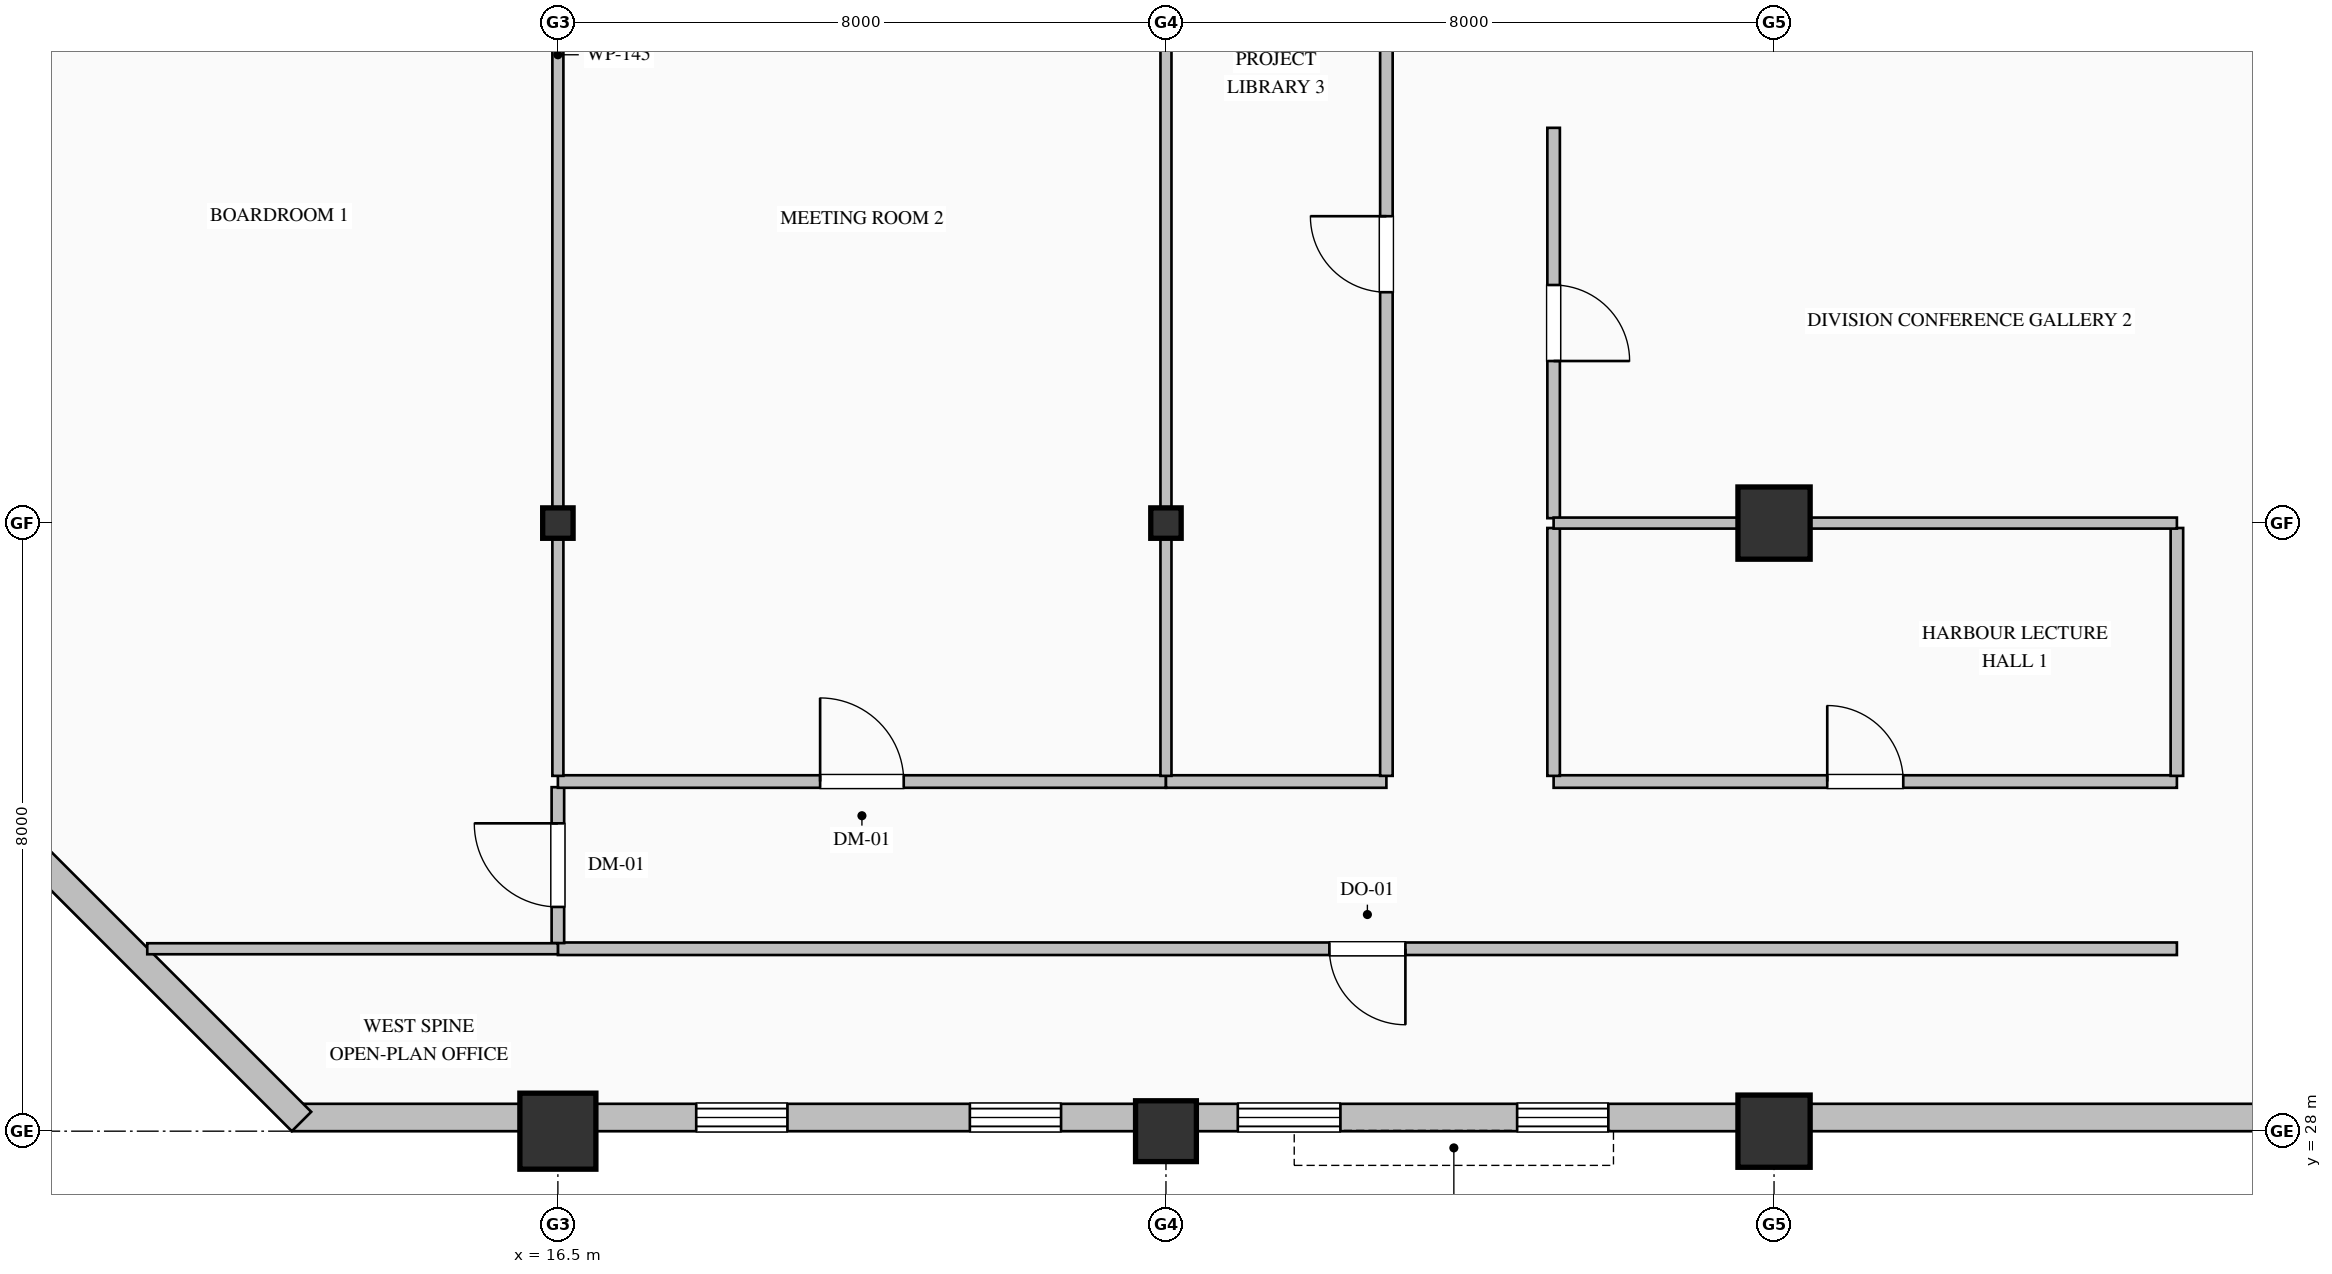
"""IFC4 building model, lengths in metres.
Left out: names, types, materials, properties, quantities, classifications, styles, units other than length and angle.
Written with IfcOpenShell. Run it as: python <this file> out.ifc"""

import sys

from ifc_helpers import new_model, si_unit, direction, frame, frame_2d, origin, origin_2d, place, context, subcontext, project, spatial, rectangle, hollow_rectangle, hollow_circle, i_section, extrude, element, fill, save


model = new_model("IFC4")
c1 = context("Model", 3, precision=1e-05, world=origin(), true_north=direction((0.0, 1.0)))
c2 = subcontext(c1, "Body", "Model", "MODEL_VIEW")
j1 = project(units=[si_unit("LENGTHUNIT", "METRE"), si_unit("PLANEANGLEUNIT", "RADIAN")], contexts=[c1])
p1 = place(None, origin())
s1 = spatial("IfcSite", under=j1, at=p1, CompositionType="ELEMENT")
p2 = place(p1, origin())
s2 = spatial("IfcBuilding", under=s1, at=p2, CompositionType="ELEMENT")
p3 = place(p2, frame((0.0, 0.0, 225.8)))
s3 = spatial("IfcBuildingStorey", under=s2, at=p3, CompositionType="ELEMENT", Elevation=225.8)
p4 = place(p3, frame((16.5, 28.0, 0.0), z_axis=(0.0, 0.0, 1.0), x_axis=(1.0, 0.0, 0.0)))
e1 = element("IfcColumn", 1, at=p4, inside=s3, PredefinedType="COLUMN", context=c2, shape_type="SweptSolid", body=[
    extrude(hollow_circle(Radius=0.5, WallThickness=0.036, at=origin_2d()), origin(), (0.0, 0.0, 1.0), 4.0),
])
p5 = place(p3, frame((16.5, 36.0, 0.0), z_axis=(0.0, 0.0, 1.0), x_axis=(1.0, 0.0, 0.0)))
e2 = element("IfcColumn", 2, at=p5, inside=s3, PredefinedType="COLUMN", context=c2, shape_type="SweptSolid", body=[
    extrude(i_section(OverallWidth=0.4, OverallDepth=0.4, WebThickness=0.013, FlangeThickness=0.021, FilletRadius=0.022, at=origin_2d()), origin(), (0.0, 0.0, 1.0), 4.0),
])
p6 = place(p3, frame((24.5, 28.0, 0.0), z_axis=(0.0, 0.0, 1.0), x_axis=(1.0, 0.0, 0.0)))
e3 = element("IfcColumn", 3, at=p6, inside=s3, PredefinedType="COLUMN", context=c2, shape_type="SweptSolid", body=[
    extrude(hollow_rectangle(XDim=0.8, YDim=0.8, WallThickness=0.032, at=origin_2d()), origin(), (0.0, 0.0, 1.0), 4.0),
])
p7 = place(p3, frame((24.5, 36.0, 0.0), z_axis=(0.0, 0.0, 1.0), x_axis=(1.0, 0.0, 0.0)))
e4 = element("IfcColumn", 4, at=p7, inside=s3, PredefinedType="COLUMN", context=c2, shape_type="SweptSolid", body=[
    extrude(i_section(OverallWidth=0.4, OverallDepth=0.4, WebThickness=0.013, FlangeThickness=0.021, FilletRadius=0.022, at=origin_2d()), origin(), (0.0, 0.0, 1.0), 4.0),
])
for number, where, z_axis, x_axis in (
    (5, (32.5, 28.0, 0.0), (0.0, 0.0, 1.0), (1.0, 0.0, 0.0)),
    (6, (32.5, 36.0, 0.0), (0.0, 0.0, 1.0), (1.0, 0.0, 0.0)),
):
    element("IfcColumn", number, at=place(p3, frame(where, z_axis=z_axis, x_axis=x_axis)), inside=s3, PredefinedType="COLUMN", context=c2, shape_type="SweptSolid", body=[
        extrude(hollow_rectangle(XDim=0.95, YDim=0.95, WallThickness=0.036, at=origin_2d()), origin(), (0.0, 0.0, 1.0), 4.0),
    ])
p8 = place(p3, frame((40.52, 28.18, 0.0), z_axis=(0.0, 0.0, 1.0), x_axis=(-1.0, 0.0, 0.0)))
e7 = element("IfcWall", 7, at=p8, inside=s3, PredefinedType="SOLIDWALL", context=c2, shape_type="SweptSolid", body=[
    extrude(rectangle(XDim=27.52, YDim=0.36, at=frame_2d((13.76, 0.0))), origin(), (0.0, 0.0, 1.0), 3.187),
])
p9 = place(p8, frame((10.2, 0.0, 0.9)))
e8 = element("IfcOpeningElement", 8, at=p9, cuts=e7, PredefinedType="OPENING", context=c2, shape_type="SweptSolid", body=[
    extrude(rectangle(XDim=1.2, YDim=1.85, at=frame_2d((0.6, 0.925))), frame((0.0, 0.19, 0.0), z_axis=(0.0, -1.0, 0.0), x_axis=(1.0, 0.0, 0.0)), (0.0, 0.0, 1.0), 0.38),
])
p10 = place(p8, frame((13.725, 0.0, 0.9)))
e9 = element("IfcOpeningElement", 9, at=p10, cuts=e7, PredefinedType="OPENING", context=c2, shape_type="SweptSolid", body=[
    extrude(rectangle(XDim=1.35, YDim=1.85, at=frame_2d((0.675, 0.925))), frame((0.0, 0.19, 0.0), z_axis=(0.0, -1.0, 0.0), x_axis=(1.0, 0.0, 0.0)), (0.0, 0.0, 1.0), 0.38),
])
p11 = place(p8, frame((17.4, 0.0, 0.7)))
e10 = element("IfcOpeningElement", 10, at=p11, cuts=e7, PredefinedType="OPENING", context=c2, shape_type="SweptSolid", body=[
    extrude(rectangle(XDim=1.2, YDim=1.85, at=frame_2d((0.6, 0.925))), frame((0.0, 0.19, 0.0), z_axis=(0.0, -1.0, 0.0), x_axis=(1.0, 0.0, 0.0)), (0.0, 0.0, 1.0), 0.38),
])
p12 = place(p8, frame((21.0, 0.0, 0.9)))
e11 = element("IfcOpeningElement", 11, at=p12, cuts=e7, PredefinedType="OPENING", context=c2, shape_type="SweptSolid", body=[
    extrude(rectangle(XDim=1.2, YDim=1.85, at=frame_2d((0.6, 0.925))), frame((0.0, 0.19, 0.0), z_axis=(0.0, -1.0, 0.0), x_axis=(1.0, 0.0, 0.0)), (0.0, 0.0, 1.0), 0.38),
])
p13 = place(p3, frame((13.127, 28.127, 0.0), z_axis=(0.0, 0.0, 1.0), x_axis=(-0.707106781187, 0.707106781187, 0.0)))
e12 = element("IfcWall", 12, at=p13, inside=s3, PredefinedType="SOLIDWALL", context=c2, shape_type="SweptSolid", body=[
    extrude(rectangle(XDim=5.657, YDim=0.36, at=frame_2d((2.828, 0.0))), origin(), (0.0, 0.0, 1.0), 3.775),
])
p14 = place(p3, frame((37.8, 30.4, 0.0), z_axis=(0.0, 0.0, 1.0), x_axis=(-1.0, 0.0, 0.0)))
e13 = element("IfcWall", 13, at=p14, inside=s3, PredefinedType="PARTITIONING", context=c2, shape_type="SweptSolid", body=[
    extrude(rectangle(XDim=21.3, YDim=0.165, at=frame_2d((10.65, 0.0))), origin(), (0.0, 0.0, 1.0), 3.775),
])
p15 = place(p14, frame((10.15, 0.0, 0.0)))
e14 = element("IfcOpeningElement", 14, at=p15, cuts=e13, PredefinedType="OPENING", context=c2, shape_type="SweptSolid", body=[
    extrude(rectangle(XDim=1.0, YDim=2.15, at=frame_2d((0.5, 1.075))), frame((0.0, 0.093, 0.0), z_axis=(0.0, -1.0, 0.0), x_axis=(1.0, 0.0, 0.0)), (0.0, 0.0, 1.0), 0.185),
])
p16 = place(p3, frame((16.5, 30.475, 0.0), z_axis=(0.0, 0.0, 1.0), x_axis=(0.0, 1.0, 0.0)))
e15 = element("IfcWall", 15, at=p16, inside=s3, PredefinedType="PARTITIONING", context=c2, shape_type="SweptSolid", body=[
    extrude(rectangle(XDim=2.051, YDim=0.165, at=frame_2d((1.025, 0.0))), origin(), (0.0, 0.0, 1.0), 3.179),
])
p17 = place(p16, frame((0.476, 0.0, 0.0)))
e16 = element("IfcOpeningElement", 16, at=p17, cuts=e15, PredefinedType="OPENING", context=c2, shape_type="SweptSolid", body=[
    extrude(rectangle(XDim=1.1, YDim=2.2, at=frame_2d((0.55, 1.1))), frame((0.0, 0.093, 0.0), z_axis=(0.0, -1.0, 0.0), x_axis=(1.0, 0.0, 0.0)), (0.0, 0.0, 1.0), 0.185),
])
p18 = place(p3, frame((16.5, 32.6, 0.0), z_axis=(0.0, 0.0, 1.0), x_axis=(1.0, 0.0, 0.0)))
e17 = element("IfcWall", 17, at=p18, inside=s3, PredefinedType="PARTITIONING", context=c2, shape_type="SweptSolid", body=[
    extrude(rectangle(XDim=8.0, YDim=0.165, at=frame_2d((4.0, 0.0))), origin(), (0.0, 0.0, 1.0), 3.775),
])
p19 = place(p18, frame((3.45, 0.0, 0.0)))
e18 = element("IfcOpeningElement", 18, at=p19, cuts=e17, PredefinedType="OPENING", context=c2, shape_type="SweptSolid", body=[
    extrude(rectangle(XDim=1.1, YDim=2.2, at=frame_2d((0.55, 1.1))), frame((0.0, 0.093, 0.0), z_axis=(0.0, -1.0, 0.0), x_axis=(1.0, 0.0, 0.0)), (0.0, 0.0, 1.0), 0.185),
])
p20 = place(p3, frame((24.5, 32.6, 0.0), z_axis=(0.0, 0.0, 1.0), x_axis=(1.0, 0.0, 0.0)))
e19 = element("IfcWall", 19, at=p20, inside=s3, PredefinedType="PARTITIONING", context=c2, shape_type="SweptSolid", body=[
    extrude(rectangle(XDim=2.9, YDim=0.165, at=frame_2d((1.45, 0.0))), origin(), (0.0, 0.0, 1.0), 3.775),
])
p21 = place(p3, frame((29.6, 32.6, 0.0), z_axis=(0.0, 0.0, 1.0), x_axis=(1.0, 0.0, 0.0)))
e20 = element("IfcWall", 20, at=p21, inside=s3, PredefinedType="PARTITIONING", context=c2, shape_type="SweptSolid", body=[
    extrude(rectangle(XDim=8.2, YDim=0.165, at=frame_2d((4.1, 0.0))), origin(), (0.0, 0.0, 1.0), 3.775),
])
p22 = place(p21, frame((3.6, 0.0, 0.0)))
e21 = element("IfcOpeningElement", 21, at=p22, cuts=e20, PredefinedType="OPENING", context=c2, shape_type="SweptSolid", body=[
    extrude(rectangle(XDim=1.0, YDim=2.15, at=frame_2d((0.5, 1.075))), frame((0.0, 0.093, 0.0), z_axis=(0.0, -1.0, 0.0), x_axis=(1.0, 0.0, 0.0)), (0.0, 0.0, 1.0), 0.185),
])
p23 = place(p3, frame((27.4, 32.675, 0.0), z_axis=(0.0, 0.0, 1.0), x_axis=(0.0, 1.0, 0.0)))
e22 = element("IfcWall", 22, at=p23, inside=s3, PredefinedType="PARTITIONING", context=c2, shape_type="SweptSolid", body=[
    extrude(rectangle(XDim=13.725, YDim=0.165, at=frame_2d((6.863, 0.0))), origin(), (0.0, 0.0, 1.0), 3.775),
])
p24 = place(p23, frame((6.363, 0.0, 0.0)))
e23 = element("IfcOpeningElement", 23, at=p24, cuts=e22, PredefinedType="OPENING", context=c2, shape_type="SweptSolid", body=[
    extrude(rectangle(XDim=1.0, YDim=2.15, at=frame_2d((0.5, 1.075))), frame((0.0, 0.093, 0.0), z_axis=(0.0, -1.0, 0.0), x_axis=(1.0, 0.0, 0.0)), (0.0, 0.0, 1.0), 0.185),
])
p25 = place(p3, frame((29.6, 35.936, 0.0), z_axis=(0.0, 0.0, 1.0), x_axis=(0.0, -1.0, 0.0)))
e24 = element("IfcWall", 24, at=p25, inside=s3, PredefinedType="PARTITIONING", context=c2, shape_type="SweptSolid", body=[
    extrude(rectangle(XDim=3.261, YDim=0.165, at=frame_2d((1.63, 0.0))), origin(), (0.0, 0.0, 1.0), 3.775),
])
p26 = place(p3, frame((29.6, 41.2, 0.0), z_axis=(0.0, 0.0, 1.0), x_axis=(0.0, -1.0, 0.0)))
e25 = element("IfcWall", 25, at=p26, inside=s3, PredefinedType="PARTITIONING", context=c2, shape_type="SweptSolid", body=[
    extrude(rectangle(XDim=5.135, YDim=0.165, at=frame_2d((2.568, 0.0))), origin(), (0.0, 0.0, 1.0), 3.775),
])
p27 = place(p26, frame((2.068, 0.0, 0.0)))
e26 = element("IfcOpeningElement", 26, at=p27, cuts=e25, PredefinedType="OPENING", context=c2, shape_type="SweptSolid", body=[
    extrude(rectangle(XDim=1.0, YDim=2.15, at=frame_2d((0.5, 1.075))), frame((0.0, 0.093, 0.0), z_axis=(0.0, -1.0, 0.0), x_axis=(1.0, 0.0, 0.0)), (0.0, 0.0, 1.0), 0.185),
])
p28 = place(p3, frame((37.8, 32.675, 0.0), z_axis=(0.0, 0.0, 1.0), x_axis=(0.0, 1.0, 0.0)))
e27 = element("IfcWall", 27, at=p28, inside=s3, PredefinedType="PARTITIONING", context=c2, shape_type="SweptSolid", body=[
    extrude(rectangle(XDim=3.261, YDim=0.165, at=frame_2d((1.63, 0.0))), origin(), (0.0, 0.0, 1.0), 3.775),
])
p29 = place(p3, frame((11.098, 30.4, 0.0), z_axis=(0.0, 0.0, 1.0), x_axis=(1.0, 0.0, 0.0)))
e28 = element("IfcWall", 28, at=p29, inside=s3, PredefinedType="PARTITIONING", context=c2, shape_type="SweptSolid", body=[
    extrude(rectangle(XDim=5.402, YDim=0.145, at=frame_2d((2.701, 0.0))), origin(), (0.0, 0.0, 1.0), 3.775),
])
for number, where, z_axis, x_axis in (
    (29, (16.5, 51.648, 0.0), (0.0, 0.0, 1.0), (0.0, -1.0, 0.0)),
    (30, (24.5, 51.648, 0.0), (0.0, 0.0, 1.0), (0.0, -1.0, 0.0)),
):
    element("IfcWall", number, at=place(p3, frame(where, z_axis=z_axis, x_axis=x_axis)), inside=s3, PredefinedType="PARTITIONING", context=c2, shape_type="SweptSolid", body=[
        extrude(rectangle(XDim=18.973, YDim=0.145, at=frame_2d((9.487, 0.0))), origin(), (0.0, 0.0, 1.0), 3.179),
    ])
p30 = place(p3, frame((29.6, 36.0, 0.0), z_axis=(0.0, 0.0, 1.0), x_axis=(1.0, 0.0, 0.0)))
e31 = element("IfcWall", 31, at=p30, inside=s3, PredefinedType="PARTITIONING", context=c2, shape_type="SweptSolid", body=[
    extrude(rectangle(XDim=8.2, YDim=0.145, at=frame_2d((4.1, 0.0))), origin(), (0.0, 0.0, 1.0), 3.179),
])
p31 = place(p9, origin())
e32 = element("IfcWindow", 32, at=p31, inside=s3, PartitioningType="DOUBLE_PANEL_VERTICAL", PredefinedType="WINDOW", context=c2, shape_type="SweptSolid", body=[
    extrude(rectangle(XDim=1.2, YDim=1.85, at=frame_2d((0.6, 0.925))), frame((0.0, 0.15, 0.0), z_axis=(0.0, -1.0, 0.0), x_axis=(1.0, 0.0, 0.0)), (0.0, 0.0, 1.0), 0.06),
])
fill(e8, e32)
p32 = place(p10, origin())
e33 = element("IfcWindow", 33, at=p32, inside=s3, PartitioningType="DOUBLE_PANEL_VERTICAL", PredefinedType="WINDOW", context=c2, shape_type="SweptSolid", body=[
    extrude(rectangle(XDim=1.35, YDim=1.85, at=frame_2d((0.675, 0.925))), frame((0.0, 0.15, 0.0), z_axis=(0.0, -1.0, 0.0), x_axis=(1.0, 0.0, 0.0)), (0.0, 0.0, 1.0), 0.06),
])
fill(e9, e33)
p33 = place(p11, origin())
e34 = element("IfcWindow", 34, at=p33, inside=s3, PartitioningType="DOUBLE_PANEL_VERTICAL", PredefinedType="WINDOW", context=c2, shape_type="SweptSolid", body=[
    extrude(rectangle(XDim=1.2, YDim=1.85, at=frame_2d((0.6, 0.925))), frame((0.0, 0.15, 0.0), z_axis=(0.0, -1.0, 0.0), x_axis=(1.0, 0.0, 0.0)), (0.0, 0.0, 1.0), 0.06),
])
fill(e10, e34)
p34 = place(p12, origin())
e35 = element("IfcWindow", 35, at=p34, inside=s3, PartitioningType="DOUBLE_PANEL_VERTICAL", PredefinedType="WINDOW", context=c2, shape_type="SweptSolid", body=[
    extrude(rectangle(XDim=1.2, YDim=1.85, at=frame_2d((0.6, 0.925))), frame((0.0, 0.15, 0.0), z_axis=(0.0, -1.0, 0.0), x_axis=(1.0, 0.0, 0.0)), (0.0, 0.0, 1.0), 0.06),
])
fill(e11, e35)
p35 = place(p15, origin())
e36 = element("IfcDoor", 36, at=p35, inside=s3, OperationType="SINGLE_SWING_LEFT", PredefinedType="DOOR", context=c2, shape_type="SweptSolid", body=[
    extrude(rectangle(XDim=1.0, YDim=2.15, at=frame_2d((0.5, 1.075))), frame((0.0, 0.025, 0.0), z_axis=(0.0, -1.0, 0.0), x_axis=(1.0, 0.0, 0.0)), (0.0, 0.0, 1.0), 0.05),
])
fill(e14, e36)
p36 = place(p17, origin())
e37 = element("IfcDoor", 37, at=p36, inside=s3, OperationType="SINGLE_SWING_RIGHT", PredefinedType="DOOR", context=c2, shape_type="SweptSolid", body=[
    extrude(rectangle(XDim=1.1, YDim=2.2, at=frame_2d((0.55, 1.1))), frame((0.0, 0.025, 0.0), z_axis=(0.0, -1.0, 0.0), x_axis=(1.0, 0.0, 0.0)), (0.0, 0.0, 1.0), 0.05),
])
fill(e16, e37)
p37 = place(p19, origin())
e38 = element("IfcDoor", 38, at=p37, inside=s3, OperationType="SINGLE_SWING_LEFT", PredefinedType="DOOR", context=c2, shape_type="SweptSolid", body=[
    extrude(rectangle(XDim=1.1, YDim=2.2, at=frame_2d((0.55, 1.1))), frame((0.0, 0.025, 0.0), z_axis=(0.0, -1.0, 0.0), x_axis=(1.0, 0.0, 0.0)), (0.0, 0.0, 1.0), 0.05),
])
fill(e18, e38)
p38 = place(p24, origin())
e39 = element("IfcDoor", 39, at=p38, inside=s3, OperationType="SINGLE_SWING_RIGHT", PredefinedType="DOOR", context=c2, shape_type="SweptSolid", body=[
    extrude(rectangle(XDim=1.0, YDim=2.15, at=frame_2d((0.5, 1.075))), frame((0.0, 0.025, 0.0), z_axis=(0.0, -1.0, 0.0), x_axis=(1.0, 0.0, 0.0)), (0.0, 0.0, 1.0), 0.05),
])
fill(e23, e39)
p39 = place(p22, origin())
e40 = element("IfcDoor", 40, at=p39, inside=s3, OperationType="SINGLE_SWING_LEFT", PredefinedType="DOOR", context=c2, shape_type="SweptSolid", body=[
    extrude(rectangle(XDim=1.0, YDim=2.15, at=frame_2d((0.5, 1.075))), frame((0.0, 0.025, 0.0), z_axis=(0.0, -1.0, 0.0), x_axis=(1.0, 0.0, 0.0)), (0.0, 0.0, 1.0), 0.05),
])
fill(e21, e40)
p40 = place(p27, origin())
e41 = element("IfcDoor", 41, at=p40, inside=s3, OperationType="SINGLE_SWING_RIGHT", PredefinedType="DOOR", context=c2, shape_type="SweptSolid", body=[
    extrude(rectangle(XDim=1.0, YDim=2.15, at=frame_2d((0.5, 1.075))), frame((0.0, 0.025, 0.0), z_axis=(0.0, -1.0, 0.0), x_axis=(1.0, 0.0, 0.0)), (0.0, 0.0, 1.0), 0.05),
])
fill(e26, e41)
save(model, sys.argv[1])
